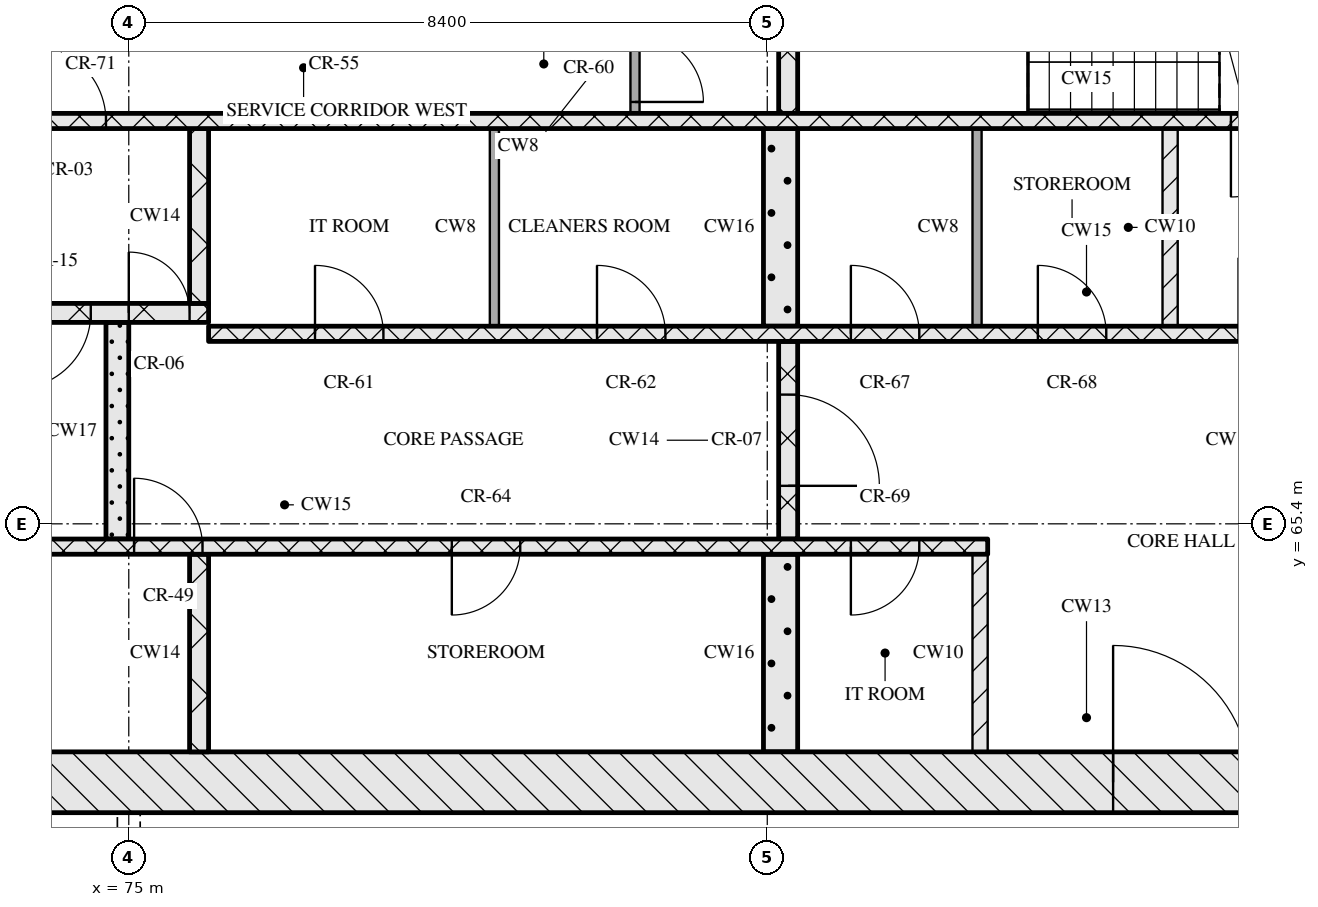
"""IFC4 building model, lengths in metres.
Left out: names, types, materials, properties, quantities, classifications, styles, units other than length and angle.
Written with IfcOpenShell. Run it as: python <this file> out.ifc"""

import sys

from ifc_helpers import new_model, si_unit, direction, frame, frame_2d, origin, place, context, subcontext, project, spatial, rectangle, extrude, element, fill, save


model = new_model("IFC4")
c1 = context("Model", 3, precision=1e-05, world=origin(), true_north=direction((0.0, 1.0)))
c2 = subcontext(c1, "Body", "Model", "MODEL_VIEW")
j1 = project(units=[si_unit("LENGTHUNIT", "METRE"), si_unit("PLANEANGLEUNIT", "RADIAN")], contexts=[c1])
p1 = place(None, origin())
s1 = spatial("IfcSite", under=j1, at=p1, CompositionType="ELEMENT")
p2 = place(p1, origin())
s2 = spatial("IfcBuilding", under=s1, at=p2, CompositionType="ELEMENT")
p3 = place(p2, frame((0.0, 0.0, 147.45)))
s3 = spatial("IfcBuildingStorey", under=s2, at=p3, CompositionType="ELEMENT", Elevation=147.45)
p4 = place(p3, frame((67.0, 62.0, 0.0), z_axis=(0.0, 0.0, 1.0), x_axis=(1.0, 0.0, 0.0)))
e1 = element("IfcWall", 1, at=p4, inside=s3, PredefinedType="SOLIDWALL", context=c2, shape_type="SweptSolid", body=[
    extrude(rectangle(XDim=41.2, YDim=0.8, at=frame_2d((20.6, 0.0))), origin(), (0.0, 0.0, 1.0), 3.32),
])
p5 = place(p4, frame((20.95, 0.0, 0.0)))
e2 = element("IfcOpeningElement", 2, at=p5, cuts=e1, PredefinedType="OPENING", context=c2, shape_type="SweptSolid", body=[
    extrude(rectangle(XDim=1.8, YDim=2.1, at=frame_2d((0.9, 1.05))), frame((0.0, 0.41, 0.0), z_axis=(0.0, -1.0, 0.0), x_axis=(1.0, 0.0, 0.0)), (0.0, 0.0, 1.0), 0.82),
])
p6 = place(p3, frame((75.925, 62.4, 0.0), z_axis=(0.0, 0.0, 1.0), x_axis=(0.0, 1.0, 0.0)))
e3 = element("IfcWall", 3, at=p6, inside=s3, PredefinedType="SOLIDWALL", context=c2, shape_type="SweptSolid", body=[
    extrude(rectangle(XDim=2.6, YDim=0.25, at=frame_2d((1.3, 0.0))), origin(), (0.0, 0.0, 1.0), 3.32),
])
p7 = place(p3, frame((83.575, 62.4, 0.0), z_axis=(0.0, 0.0, 1.0), x_axis=(0.0, 1.0, 0.0)))
e4 = element("IfcWall", 4, at=p7, inside=s3, PredefinedType="SOLIDWALL", context=c2, shape_type="SweptSolid", body=[
    extrude(rectangle(XDim=2.6, YDim=0.45, at=frame_2d((1.3, 0.0))), origin(), (0.0, 0.0, 1.0), 3.32),
])
p8 = place(p3, frame((86.2, 62.4, 0.0), z_axis=(0.0, 0.0, 1.0), x_axis=(0.0, 1.0, 0.0)))
e5 = element("IfcWall", 5, at=p8, inside=s3, PredefinedType="PARTITIONING", context=c2, shape_type="SweptSolid", body=[
    extrude(rectangle(XDim=2.6, YDim=0.2, at=frame_2d((1.3, 0.0))), origin(), (0.0, 0.0, 1.0), 3.32),
])
p9 = place(p3, frame((67.8, 65.1, 0.0), z_axis=(0.0, 0.0, 1.0), x_axis=(1.0, 0.0, 0.0)))
e6 = element("IfcWall", 6, at=p9, inside=s3, PredefinedType="SOLIDWALL", context=c2, shape_type="SweptSolid", body=[
    extrude(rectangle(XDim=18.5, YDim=0.2, at=frame_2d((9.25, 0.0))), origin(), (0.0, 0.0, 1.0), 3.32),
])
p10 = place(p9, frame((7.27, 0.0, 0.0)))
e7 = element("IfcOpeningElement", 7, at=p10, cuts=e6, PredefinedType="OPENING", context=c2, shape_type="SweptSolid", body=[
    extrude(rectangle(XDim=0.9, YDim=2.1, at=frame_2d((0.45, 1.05))), frame((0.0, 0.11, 0.0), z_axis=(0.0, -1.0, 0.0), x_axis=(1.0, 0.0, 0.0)), (0.0, 0.0, 1.0), 0.22),
])
p11 = place(p9, frame((11.45, 0.0, 0.0)))
e8 = element("IfcOpeningElement", 8, at=p11, cuts=e6, PredefinedType="OPENING", context=c2, shape_type="SweptSolid", body=[
    extrude(rectangle(XDim=0.9, YDim=2.1, at=frame_2d((0.45, 1.05))), frame((0.0, 0.11, 0.0), z_axis=(0.0, -1.0, 0.0), x_axis=(1.0, 0.0, 0.0)), (0.0, 0.0, 1.0), 0.22),
])
p12 = place(p9, frame((16.7, 0.0, 0.0)))
e9 = element("IfcOpeningElement", 9, at=p12, cuts=e6, PredefinedType="OPENING", context=c2, shape_type="SweptSolid", body=[
    extrude(rectangle(XDim=0.9, YDim=2.1, at=frame_2d((0.45, 1.05))), frame((0.0, 0.11, 0.0), z_axis=(0.0, -1.0, 0.0), x_axis=(1.0, 0.0, 0.0)), (0.0, 0.0, 1.0), 0.22),
])
p13 = place(p3, frame((74.85, 65.2, 0.0), z_axis=(0.0, 0.0, 1.0), x_axis=(0.0, 1.0, 0.0)))
e10 = element("IfcWall", 10, at=p13, inside=s3, PredefinedType="SOLIDWALL", context=c2, shape_type="SweptSolid", body=[
    extrude(rectangle(XDim=2.85, YDim=0.3, at=frame_2d((1.425, 0.0))), origin(), (0.0, 0.0, 1.0), 3.32),
])
p14 = place(p3, frame((83.675, 65.2, 0.0), z_axis=(0.0, 0.0, 1.0), x_axis=(0.0, 1.0, 0.0)))
e11 = element("IfcWall", 11, at=p14, inside=s3, PredefinedType="SOLIDWALL", context=c2, shape_type="SweptSolid", body=[
    extrude(rectangle(XDim=2.6, YDim=0.25, at=frame_2d((1.3, 0.0))), origin(), (0.0, 0.0, 1.0), 3.32),
])
p15 = place(p14, frame((0.7, 0.0, 0.0)))
e12 = element("IfcOpeningElement", 12, at=p15, cuts=e11, PredefinedType="OPENING", context=c2, shape_type="SweptSolid", body=[
    extrude(rectangle(XDim=1.2, YDim=2.1, at=frame_2d((0.6, 1.05))), frame((0.0, 0.135, 0.0), z_axis=(0.0, -1.0, 0.0), x_axis=(1.0, 0.0, 0.0)), (0.0, 0.0, 1.0), 0.27),
])
p16 = place(p3, frame((76.05, 67.9, 0.0), z_axis=(0.0, 0.0, 1.0), x_axis=(1.0, 0.0, 0.0)))
e13 = element("IfcWall", 13, at=p16, inside=s3, PredefinedType="SOLIDWALL", context=c2, shape_type="SweptSolid", body=[
    extrude(rectangle(XDim=23.1, YDim=0.2, at=frame_2d((11.55, 0.0))), origin(), (0.0, 0.0, 1.0), 3.32),
])
p17 = place(p16, frame((1.4, 0.0, 0.0)))
e14 = element("IfcOpeningElement", 14, at=p17, cuts=e13, PredefinedType="OPENING", context=c2, shape_type="SweptSolid", body=[
    extrude(rectangle(XDim=0.9, YDim=2.1, at=frame_2d((0.45, 1.05))), frame((0.0, 0.11, 0.0), z_axis=(0.0, -1.0, 0.0), x_axis=(1.0, 0.0, 0.0)), (0.0, 0.0, 1.0), 0.22),
])
p18 = place(p16, frame((5.11, 0.0, 0.0)))
e15 = element("IfcOpeningElement", 15, at=p18, cuts=e13, PredefinedType="OPENING", context=c2, shape_type="SweptSolid", body=[
    extrude(rectangle(XDim=0.9, YDim=2.1, at=frame_2d((0.45, 1.05))), frame((0.0, 0.11, 0.0), z_axis=(0.0, -1.0, 0.0), x_axis=(1.0, 0.0, 0.0)), (0.0, 0.0, 1.0), 0.22),
])
p19 = place(p16, frame((8.45, 0.0, 0.0)))
e16 = element("IfcOpeningElement", 16, at=p19, cuts=e13, PredefinedType="OPENING", context=c2, shape_type="SweptSolid", body=[
    extrude(rectangle(XDim=0.9, YDim=2.1, at=frame_2d((0.45, 1.05))), frame((0.0, 0.11, 0.0), z_axis=(0.0, -1.0, 0.0), x_axis=(1.0, 0.0, 0.0)), (0.0, 0.0, 1.0), 0.22),
])
p20 = place(p16, frame((10.91, 0.0, 0.0)))
e17 = element("IfcOpeningElement", 17, at=p20, cuts=e13, PredefinedType="OPENING", context=c2, shape_type="SweptSolid", body=[
    extrude(rectangle(XDim=0.9, YDim=2.1, at=frame_2d((0.45, 1.05))), frame((0.0, 0.11, 0.0), z_axis=(0.0, -1.0, 0.0), x_axis=(1.0, 0.0, 0.0)), (0.0, 0.0, 1.0), 0.22),
])
p21 = place(p16, frame((13.55, 0.0, 0.0)))
e18 = element("IfcOpeningElement", 18, at=p21, cuts=e13, PredefinedType="OPENING", context=c2, shape_type="SweptSolid", body=[
    extrude(rectangle(XDim=1.0, YDim=2.1, at=frame_2d((0.5, 1.05))), frame((0.0, 0.11, 0.0), z_axis=(0.0, -1.0, 0.0), x_axis=(1.0, 0.0, 0.0)), (0.0, 0.0, 1.0), 0.22),
])
p22 = place(p16, frame((16.2, 0.0, 0.0)))
e19 = element("IfcOpeningElement", 19, at=p22, cuts=e13, PredefinedType="OPENING", context=c2, shape_type="SweptSolid", body=[
    extrude(rectangle(XDim=1.1, YDim=2.1, at=frame_2d((0.55, 1.05))), frame((0.0, 0.11, 0.0), z_axis=(0.0, -1.0, 0.0), x_axis=(1.0, 0.0, 0.0)), (0.0, 0.0, 1.0), 0.22),
])
p23 = place(p16, frame((18.7, 0.0, 0.0)))
e20 = element("IfcOpeningElement", 20, at=p23, cuts=e13, PredefinedType="OPENING", context=c2, shape_type="SweptSolid", body=[
    extrude(rectangle(XDim=1.1, YDim=2.1, at=frame_2d((0.55, 1.05))), frame((0.0, 0.11, 0.0), z_axis=(0.0, -1.0, 0.0), x_axis=(1.0, 0.0, 0.0)), (0.0, 0.0, 1.0), 0.22),
])
p24 = place(p16, frame((21.2, 0.0, 0.0)))
e21 = element("IfcOpeningElement", 21, at=p24, cuts=e13, PredefinedType="OPENING", context=c2, shape_type="SweptSolid", body=[
    extrude(rectangle(XDim=1.1, YDim=2.1, at=frame_2d((0.55, 1.05))), frame((0.0, 0.11, 0.0), z_axis=(0.0, -1.0, 0.0), x_axis=(1.0, 0.0, 0.0)), (0.0, 0.0, 1.0), 0.22),
])
p25 = place(p3, frame((79.81, 68.0, 0.0), z_axis=(0.0, 0.0, 1.0), x_axis=(0.0, 1.0, 0.0)))
e22 = element("IfcWall", 22, at=p25, inside=s3, PredefinedType="PARTITIONING", context=c2, shape_type="SweptSolid", body=[
    extrude(rectangle(XDim=2.6, YDim=0.12, at=frame_2d((1.3, 0.0))), origin(), (0.0, 0.0, 1.0), 3.32),
])
p26 = place(p3, frame((83.575, 68.0, 0.0), z_axis=(0.0, 0.0, 1.0), x_axis=(0.0, 1.0, 0.0)))
e23 = element("IfcWall", 23, at=p26, inside=s3, PredefinedType="SOLIDWALL", context=c2, shape_type="SweptSolid", body=[
    extrude(rectangle(XDim=2.6, YDim=0.45, at=frame_2d((1.3, 0.0))), origin(), (0.0, 0.0, 1.0), 3.32),
])
p27 = place(p3, frame((86.16, 68.0, 0.0), z_axis=(0.0, 0.0, 1.0), x_axis=(0.0, 1.0, 0.0)))
e24 = element("IfcWall", 24, at=p27, inside=s3, PredefinedType="PARTITIONING", context=c2, shape_type="SweptSolid", body=[
    extrude(rectangle(XDim=2.6, YDim=0.12, at=frame_2d((1.3, 0.0))), origin(), (0.0, 0.0, 1.0), 3.32),
])
p28 = place(p3, frame((88.7, 68.0, 0.0), z_axis=(0.0, 0.0, 1.0), x_axis=(0.0, 1.0, 0.0)))
e25 = element("IfcWall", 25, at=p28, inside=s3, PredefinedType="PARTITIONING", context=c2, shape_type="SweptSolid", body=[
    extrude(rectangle(XDim=2.6, YDim=0.2, at=frame_2d((1.3, 0.0))), origin(), (0.0, 0.0, 1.0), 3.32),
])
p29 = place(p3, frame((67.8, 68.175, 0.0), z_axis=(0.0, 0.0, 1.0), x_axis=(1.0, 0.0, 0.0)))
e26 = element("IfcWall", 26, at=p29, inside=s3, PredefinedType="SOLIDWALL", context=c2, shape_type="SweptSolid", body=[
    extrude(rectangle(XDim=8.25, YDim=0.25, at=frame_2d((4.125, 0.0))), origin(), (0.0, 0.0, 1.0), 3.32),
])
p30 = place(p29, frame((5.7, 0.0, 0.0)))
e27 = element("IfcOpeningElement", 27, at=p30, cuts=e26, PredefinedType="OPENING", context=c2, shape_type="SweptSolid", body=[
    extrude(rectangle(XDim=1.0, YDim=2.1, at=frame_2d((0.5, 1.05))), frame((0.0, 0.135, 0.0), z_axis=(0.0, -1.0, 0.0), x_axis=(1.0, 0.0, 0.0)), (0.0, 0.0, 1.0), 0.27),
])
p31 = place(p29, frame((7.2, 0.0, 0.0)))
e28 = element("IfcOpeningElement", 28, at=p31, cuts=e26, PredefinedType="OPENING", context=c2, shape_type="SweptSolid", body=[
    extrude(rectangle(XDim=0.8, YDim=2.1, at=frame_2d((0.4, 1.05))), frame((0.0, 0.135, 0.0), z_axis=(0.0, -1.0, 0.0), x_axis=(1.0, 0.0, 0.0)), (0.0, 0.0, 1.0), 0.27),
])
p32 = place(p3, frame((75.925, 68.3, 0.0), z_axis=(0.0, 0.0, 1.0), x_axis=(0.0, 1.0, 0.0)))
e29 = element("IfcWall", 29, at=p32, inside=s3, PredefinedType="SOLIDWALL", context=c2, shape_type="SweptSolid", body=[
    extrude(rectangle(XDim=2.3, YDim=0.25, at=frame_2d((1.15, 0.0))), origin(), (0.0, 0.0, 1.0), 3.32),
])
p33 = place(p3, frame((67.8, 70.7, 0.0), z_axis=(0.0, 0.0, 1.0), x_axis=(1.0, 0.0, 0.0)))
e30 = element("IfcWall", 30, at=p33, inside=s3, PredefinedType="SOLIDWALL", context=c2, shape_type="SweptSolid", body=[
    extrude(rectangle(XDim=39.6, YDim=0.2, at=frame_2d((19.8, 0.0))), origin(), (0.0, 0.0, 1.0), 3.32),
])
p34 = place(p33, frame((0.65, 0.0, 0.0)))
e31 = element("IfcOpeningElement", 31, at=p34, cuts=e30, PredefinedType="OPENING", context=c2, shape_type="SweptSolid", body=[
    extrude(rectangle(XDim=1.1, YDim=2.1, at=frame_2d((0.55, 1.05))), frame((0.0, 0.11, 0.0), z_axis=(0.0, -1.0, 0.0), x_axis=(1.0, 0.0, 0.0)), (0.0, 0.0, 1.0), 0.22),
])
p35 = place(p33, frame((3.25, 0.0, 0.0)))
e32 = element("IfcOpeningElement", 32, at=p35, cuts=e30, PredefinedType="OPENING", context=c2, shape_type="SweptSolid", body=[
    extrude(rectangle(XDim=1.1, YDim=2.1, at=frame_2d((0.55, 1.05))), frame((0.0, 0.11, 0.0), z_axis=(0.0, -1.0, 0.0), x_axis=(1.0, 0.0, 0.0)), (0.0, 0.0, 1.0), 0.22),
])
p36 = place(p33, frame((5.9, 0.0, 0.0)))
e33 = element("IfcOpeningElement", 33, at=p36, cuts=e30, PredefinedType="OPENING", context=c2, shape_type="SweptSolid", body=[
    extrude(rectangle(XDim=1.0, YDim=2.1, at=frame_2d((0.5, 1.05))), frame((0.0, 0.11, 0.0), z_axis=(0.0, -1.0, 0.0), x_axis=(1.0, 0.0, 0.0)), (0.0, 0.0, 1.0), 0.22),
])
p37 = place(p33, frame((21.7, 0.0, 0.0)))
e34 = element("IfcOpeningElement", 34, at=p37, cuts=e30, PredefinedType="OPENING", context=c2, shape_type="SweptSolid", body=[
    extrude(rectangle(XDim=1.0, YDim=2.1, at=frame_2d((0.5, 1.05))), frame((0.0, 0.11, 0.0), z_axis=(0.0, -1.0, 0.0), x_axis=(1.0, 0.0, 0.0)), (0.0, 0.0, 1.0), 0.22),
])
p38 = place(p33, frame((32.7, 0.0, 0.0)))
e35 = element("IfcOpeningElement", 35, at=p38, cuts=e30, PredefinedType="OPENING", context=c2, shape_type="SweptSolid", body=[
    extrude(rectangle(XDim=1.0, YDim=2.1, at=frame_2d((0.5, 1.05))), frame((0.0, 0.11, 0.0), z_axis=(0.0, -1.0, 0.0), x_axis=(1.0, 0.0, 0.0)), (0.0, 0.0, 1.0), 0.22),
])
p39 = place(p33, frame((35.25, 0.0, 0.0)))
e36 = element("IfcOpeningElement", 36, at=p39, cuts=e30, PredefinedType="OPENING", context=c2, shape_type="SweptSolid", body=[
    extrude(rectangle(XDim=1.1, YDim=2.1, at=frame_2d((0.55, 1.05))), frame((0.0, 0.11, 0.0), z_axis=(0.0, -1.0, 0.0), x_axis=(1.0, 0.0, 0.0)), (0.0, 0.0, 1.0), 0.22),
])
p40 = place(p33, frame((37.85, 0.0, 0.0)))
e37 = element("IfcOpeningElement", 37, at=p40, cuts=e30, PredefinedType="OPENING", context=c2, shape_type="SweptSolid", body=[
    extrude(rectangle(XDim=1.1, YDim=2.1, at=frame_2d((0.55, 1.05))), frame((0.0, 0.11, 0.0), z_axis=(0.0, -1.0, 0.0), x_axis=(1.0, 0.0, 0.0)), (0.0, 0.0, 1.0), 0.22),
])
p41 = place(p3, frame((81.66, 70.8, 0.0), z_axis=(0.0, 0.0, 1.0), x_axis=(0.0, 1.0, 0.0)))
e38 = element("IfcWall", 38, at=p41, inside=s3, PredefinedType="PARTITIONING", context=c2, shape_type="SweptSolid", body=[
    extrude(rectangle(XDim=1.2, YDim=0.12, at=frame_2d((0.6, 0.0))), origin(), (0.0, 0.0, 1.0), 3.32),
])
p42 = place(p41, frame((0.15, 0.0, 0.0)))
e39 = element("IfcOpeningElement", 39, at=p42, cuts=e38, PredefinedType="OPENING", context=c2, shape_type="SweptSolid", body=[
    extrude(rectangle(XDim=0.9, YDim=2.1, at=frame_2d((0.45, 1.05))), frame((0.0, 0.07, 0.0), z_axis=(0.0, -1.0, 0.0), x_axis=(1.0, 0.0, 0.0)), (0.0, 0.0, 1.0), 0.14),
])
p43 = place(p3, frame((83.675, 70.8, 0.0), z_axis=(0.0, 0.0, 1.0), x_axis=(0.0, 1.0, 0.0)))
e40 = element("IfcWall", 40, at=p43, inside=s3, PredefinedType="SOLIDWALL", context=c2, shape_type="SweptSolid", body=[
    extrude(rectangle(XDim=2.95, YDim=0.25, at=frame_2d((1.475, 0.0))), origin(), (0.0, 0.0, 1.0), 3.32),
])
p44 = place(p5, origin())
e41 = element("IfcDoor", 41, at=p44, inside=s3, OperationType="DOUBLE_DOOR_SINGLE_SWING", PredefinedType="DOOR", context=c2, shape_type="SweptSolid", body=[
    extrude(rectangle(XDim=1.8, YDim=2.1, at=frame_2d((0.9, 1.05))), frame((0.0, 0.025, 0.0), z_axis=(0.0, -1.0, 0.0), x_axis=(1.0, 0.0, 0.0)), (0.0, 0.0, 1.0), 0.05),
])
fill(e2, e41)
p45 = place(p10, origin())
e42 = element("IfcDoor", 42, at=p45, inside=s3, OperationType="SINGLE_SWING_LEFT", PredefinedType="DOOR", context=c2, shape_type="SweptSolid", body=[
    extrude(rectangle(XDim=0.9, YDim=2.1, at=frame_2d((0.45, 1.05))), frame((0.0, 0.025, 0.0), z_axis=(0.0, -1.0, 0.0), x_axis=(1.0, 0.0, 0.0)), (0.0, 0.0, 1.0), 0.05),
])
fill(e7, e42)
p46 = place(p11, origin())
e43 = element("IfcDoor", 43, at=p46, inside=s3, OperationType="SINGLE_SWING_RIGHT", PredefinedType="DOOR", context=c2, shape_type="SweptSolid", body=[
    extrude(rectangle(XDim=0.9, YDim=2.1, at=frame_2d((0.45, 1.05))), frame((0.0, 0.025, 0.0), z_axis=(0.0, -1.0, 0.0), x_axis=(1.0, 0.0, 0.0)), (0.0, 0.0, 1.0), 0.05),
])
fill(e8, e43)
p47 = place(p12, origin())
e44 = element("IfcDoor", 44, at=p47, inside=s3, OperationType="SINGLE_SWING_RIGHT", PredefinedType="DOOR", context=c2, shape_type="SweptSolid", body=[
    extrude(rectangle(XDim=0.9, YDim=2.1, at=frame_2d((0.45, 1.05))), frame((0.0, 0.025, 0.0), z_axis=(0.0, -1.0, 0.0), x_axis=(1.0, 0.0, 0.0)), (0.0, 0.0, 1.0), 0.05),
])
fill(e9, e44)
p48 = place(p15, origin())
e45 = element("IfcDoor", 45, at=p48, inside=s3, OperationType="SINGLE_SWING_RIGHT", PredefinedType="DOOR", context=c2, shape_type="SweptSolid", body=[
    extrude(rectangle(XDim=1.2, YDim=2.1, at=frame_2d((0.6, 1.05))), frame((0.0, 0.025, 0.0), z_axis=(0.0, -1.0, 0.0), x_axis=(1.0, 0.0, 0.0)), (0.0, 0.0, 1.0), 0.05),
])
fill(e12, e45)
p49 = place(p17, origin())
e46 = element("IfcDoor", 46, at=p49, inside=s3, OperationType="SINGLE_SWING_LEFT", PredefinedType="DOOR", context=c2, shape_type="SweptSolid", body=[
    extrude(rectangle(XDim=0.9, YDim=2.1, at=frame_2d((0.45, 1.05))), frame((0.0, 0.025, 0.0), z_axis=(0.0, -1.0, 0.0), x_axis=(1.0, 0.0, 0.0)), (0.0, 0.0, 1.0), 0.05),
])
fill(e14, e46)
p50 = place(p18, origin())
e47 = element("IfcDoor", 47, at=p50, inside=s3, OperationType="SINGLE_SWING_LEFT", PredefinedType="DOOR", context=c2, shape_type="SweptSolid", body=[
    extrude(rectangle(XDim=0.9, YDim=2.1, at=frame_2d((0.45, 1.05))), frame((0.0, 0.025, 0.0), z_axis=(0.0, -1.0, 0.0), x_axis=(1.0, 0.0, 0.0)), (0.0, 0.0, 1.0), 0.05),
])
fill(e15, e47)
p51 = place(p19, origin())
e48 = element("IfcDoor", 48, at=p51, inside=s3, OperationType="SINGLE_SWING_LEFT", PredefinedType="DOOR", context=c2, shape_type="SweptSolid", body=[
    extrude(rectangle(XDim=0.9, YDim=2.1, at=frame_2d((0.45, 1.05))), frame((0.0, 0.025, 0.0), z_axis=(0.0, -1.0, 0.0), x_axis=(1.0, 0.0, 0.0)), (0.0, 0.0, 1.0), 0.05),
])
fill(e16, e48)
p52 = place(p20, origin())
e49 = element("IfcDoor", 49, at=p52, inside=s3, OperationType="SINGLE_SWING_LEFT", PredefinedType="DOOR", context=c2, shape_type="SweptSolid", body=[
    extrude(rectangle(XDim=0.9, YDim=2.1, at=frame_2d((0.45, 1.05))), frame((0.0, 0.025, 0.0), z_axis=(0.0, -1.0, 0.0), x_axis=(1.0, 0.0, 0.0)), (0.0, 0.0, 1.0), 0.05),
])
fill(e17, e49)
p53 = place(p30, origin())
e50 = element("IfcDoor", 50, at=p53, inside=s3, OperationType="SINGLE_SWING_RIGHT", PredefinedType="DOOR", context=c2, shape_type="SweptSolid", body=[
    extrude(rectangle(XDim=1.0, YDim=2.1, at=frame_2d((0.5, 1.05))), frame((0.0, 0.025, 0.0), z_axis=(0.0, -1.0, 0.0), x_axis=(1.0, 0.0, 0.0)), (0.0, 0.0, 1.0), 0.05),
])
fill(e27, e50)
p54 = place(p31, origin())
e51 = element("IfcDoor", 51, at=p54, inside=s3, OperationType="SINGLE_SWING_LEFT", PredefinedType="DOOR", context=c2, shape_type="SweptSolid", body=[
    extrude(rectangle(XDim=0.8, YDim=2.1, at=frame_2d((0.4, 1.05))), frame((0.0, 0.025, 0.0), z_axis=(0.0, -1.0, 0.0), x_axis=(1.0, 0.0, 0.0)), (0.0, 0.0, 1.0), 0.05),
])
fill(e28, e51)
p55 = place(p36, origin())
e52 = element("IfcDoor", 52, at=p55, inside=s3, OperationType="SINGLE_SWING_LEFT", PredefinedType="DOOR", context=c2, shape_type="SweptSolid", body=[
    extrude(rectangle(XDim=1.0, YDim=2.1, at=frame_2d((0.5, 1.05))), frame((0.0, 0.025, 0.0), z_axis=(0.0, -1.0, 0.0), x_axis=(1.0, 0.0, 0.0)), (0.0, 0.0, 1.0), 0.05),
])
fill(e33, e52)
p56 = place(p37, origin())
e53 = element("IfcDoor", 53, at=p56, inside=s3, OperationType="SINGLE_SWING_RIGHT", PredefinedType="DOOR", context=c2, shape_type="SweptSolid", body=[
    extrude(rectangle(XDim=1.0, YDim=2.1, at=frame_2d((0.5, 1.05))), frame((0.0, 0.025, 0.0), z_axis=(0.0, -1.0, 0.0), x_axis=(1.0, 0.0, 0.0)), (0.0, 0.0, 1.0), 0.05),
])
fill(e34, e53)
p57 = place(p42, origin())
e54 = element("IfcDoor", 54, at=p57, inside=s3, OperationType="SINGLE_SWING_RIGHT", PredefinedType="DOOR", context=c2, shape_type="SweptSolid", body=[
    extrude(rectangle(XDim=0.9, YDim=2.1, at=frame_2d((0.45, 1.05))), frame((0.0, 0.025, 0.0), z_axis=(0.0, -1.0, 0.0), x_axis=(1.0, 0.0, 0.0)), (0.0, 0.0, 1.0), 0.05),
])
fill(e39, e54)
save(model, sys.argv[1])
